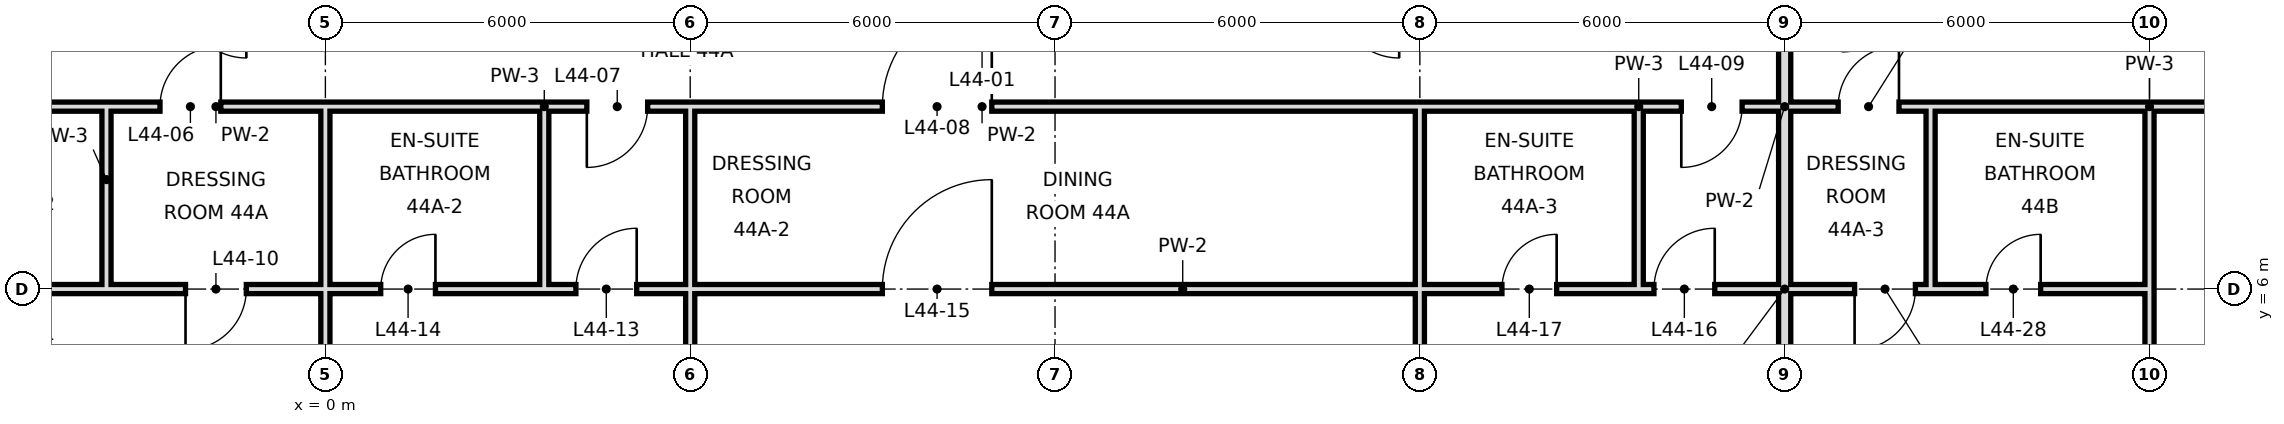
"""IFC4 building model, lengths in metres.
Left out: names, types, materials, properties, quantities, classifications, styles, units other than length and angle.
Written with IfcOpenShell. Run it as: python <this file> out.ifc"""

import sys

from ifc_helpers import new_model, si_unit, direction, frame, frame_2d, origin, place, context, subcontext, project, spatial, rectangle, extrude, element, fill, save


model = new_model("IFC4")
c1 = context("Model", 3, precision=1e-05, world=origin(), true_north=direction((0.0, 1.0)))
c2 = subcontext(c1, "Body", "Model", "MODEL_VIEW")
j1 = project(units=[si_unit("LENGTHUNIT", "METRE"), si_unit("PLANEANGLEUNIT", "RADIAN")], contexts=[c1])
p1 = place(None, origin())
s1 = spatial("IfcSite", under=j1, at=p1, CompositionType="ELEMENT")
p2 = place(p1, origin())
s2 = spatial("IfcBuilding", under=s1, at=p2, CompositionType="ELEMENT")
p3 = place(p2, frame((0.0, 0.0, 192.0)))
s3 = spatial("IfcBuildingStorey", under=s2, at=p3, CompositionType="ELEMENT", Elevation=192.0)
p4 = place(p3, frame((-3.6, 6.0, 0.0), z_axis=(0.0, 0.0, 1.0), x_axis=(0.0, 1.0, 0.0)))
e1 = element("IfcWall", 1, at=p4, inside=s3, PredefinedType="PARTITIONING", context=c2, shape_type="SweptSolid", body=[
    extrude(rectangle(XDim=3.0, YDim=0.15, at=frame_2d((1.5, 0.0))), origin(), (0.0, 0.0, 1.0), 3.42),
])
p5 = place(p3, frame((0.0, 0.0, 0.0), z_axis=(0.0, 0.0, 1.0), x_axis=(0.0, 1.0, 0.0)))
e2 = element("IfcWall", 2, at=p5, inside=s3, PredefinedType="PARTITIONING", context=c2, shape_type="SweptSolid", body=[
    extrude(rectangle(XDim=6.0, YDim=0.15, at=frame_2d((3.0, 0.0))), origin(), (0.0, 0.0, 1.0), 2.72),
])
p6 = place(p3, frame((0.0, 6.0, 0.0), z_axis=(0.0, 0.0, 1.0), x_axis=(0.0, 1.0, 0.0)))
e3 = element("IfcWall", 3, at=p6, inside=s3, PredefinedType="PARTITIONING", context=c2, shape_type="SweptSolid", body=[
    extrude(rectangle(XDim=3.0, YDim=0.15, at=frame_2d((1.5, 0.0))), origin(), (0.0, 0.0, 1.0), 2.72),
])
p7 = place(p3, frame((18.0, -0.6, 0.0), z_axis=(0.0, 0.0, 1.0), x_axis=(0.0, 1.0, 0.0)))
e4 = element("IfcWall", 4, at=p7, inside=s3, PredefinedType="PARTITIONING", context=c2, shape_type="SweptSolid", body=[
    extrude(rectangle(XDim=6.6, YDim=0.15, at=frame_2d((3.3, 0.0))), origin(), (0.0, 0.0, 1.0), 2.72),
])
p8 = place(p3, frame((18.0, 6.0, 0.0), z_axis=(0.0, 0.0, 1.0), x_axis=(0.0, 1.0, 0.0)))
e5 = element("IfcWall", 5, at=p8, inside=s3, PredefinedType="PARTITIONING", context=c2, shape_type="SweptSolid", body=[
    extrude(rectangle(XDim=3.0, YDim=0.15, at=frame_2d((1.5, 0.0))), origin(), (0.0, 0.0, 1.0), 2.72),
])
p9 = place(p3, frame((21.6, 6.0, 0.0), z_axis=(0.0, 0.0, 1.0), x_axis=(0.0, 1.0, 0.0)))
e6 = element("IfcWall", 6, at=p9, inside=s3, PredefinedType="PARTITIONING", context=c2, shape_type="SweptSolid", body=[
    extrude(rectangle(XDim=3.0, YDim=0.15, at=frame_2d((1.5, 0.0))), origin(), (0.0, 0.0, 1.0), 3.42),
])
p10 = place(p3, frame((24.0, 0.0, 0.0), z_axis=(0.0, 0.0, 1.0), x_axis=(0.0, 1.0, 0.0)))
e7 = element("IfcWall", 7, at=p10, inside=s3, PredefinedType="SOLIDWALL", context=c2, shape_type="SweptSolid", body=[
    extrude(rectangle(XDim=15.3, YDim=0.2, at=frame_2d((7.65, 0.0))), origin(), (0.0, 0.0, 1.0), 2.72),
])
for number, where, z_axis, x_axis in (
    (8, (26.4, 6.0, 0.0), (0.0, 0.0, 1.0), (0.0, 1.0, 0.0)),
    (9, (3.6, 6.0, 0.0), (0.0, 0.0, 1.0), (0.0, 1.0, 0.0)),
):
    element("IfcWall", number, at=place(p3, frame(where, z_axis=z_axis, x_axis=x_axis)), inside=s3, PredefinedType="PARTITIONING", context=c2, shape_type="SweptSolid", body=[
        extrude(rectangle(XDim=3.0, YDim=0.15, at=frame_2d((1.5, 0.0))), origin(), (0.0, 0.0, 1.0), 3.42),
    ])
p11 = place(p3, frame((30.0, -0.6, 0.0), z_axis=(0.0, 0.0, 1.0), x_axis=(0.0, 1.0, 0.0)))
e10 = element("IfcWall", 10, at=p11, inside=s3, PredefinedType="PARTITIONING", context=c2, shape_type="SweptSolid", body=[
    extrude(rectangle(XDim=6.6, YDim=0.15, at=frame_2d((3.3, 0.0))), origin(), (0.0, 0.0, 1.0), 2.72),
])
p12 = place(p3, frame((30.0, 6.0, 0.0), z_axis=(0.0, 0.0, 1.0), x_axis=(0.0, 1.0, 0.0)))
e11 = element("IfcWall", 11, at=p12, inside=s3, PredefinedType="PARTITIONING", context=c2, shape_type="SweptSolid", body=[
    extrude(rectangle(XDim=3.0, YDim=0.15, at=frame_2d((1.5, 0.0))), origin(), (0.0, 0.0, 1.0), 2.72),
])
p13 = place(p3, frame((6.0, -0.6, 0.0), z_axis=(0.0, 0.0, 1.0), x_axis=(0.0, 1.0, 0.0)))
e12 = element("IfcWall", 12, at=p13, inside=s3, PredefinedType="PARTITIONING", context=c2, shape_type="SweptSolid", body=[
    extrude(rectangle(XDim=9.6, YDim=0.15, at=frame_2d((4.8, 0.0))), origin(), (0.0, 0.0, 1.0), 2.72),
])
p14 = place(p3, frame((-3.6, 6.0, 0.0), z_axis=(0.0, 0.0, 1.0), x_axis=(1.0, 0.0, 0.0)))
e13 = element("IfcWall", 13, at=p14, inside=s3, PredefinedType="PARTITIONING", context=c2, shape_type="SweptSolid", body=[
    extrude(rectangle(XDim=3.6, YDim=0.15, at=frame_2d((1.8, 0.0))), origin(), (0.0, 0.0, 1.0), 2.72),
])
p15 = place(p14, frame((1.3, 0.0, 0.0)))
e14 = element("IfcOpeningElement", 14, at=p15, cuts=e13, PredefinedType="OPENING", context=c2, shape_type="SweptSolid", body=[
    extrude(rectangle(XDim=1.0, YDim=2.4, at=frame_2d((0.5, 1.2))), frame((0.0, 0.085, 0.0), z_axis=(0.0, -1.0, 0.0), x_axis=(1.0, 0.0, 0.0)), (0.0, 0.0, 1.0), 0.17),
])
p16 = place(p3, frame((3.6, 6.0, 0.0), z_axis=(0.0, 0.0, 1.0), x_axis=(1.0, 0.0, 0.0)))
e15 = element("IfcWall", 15, at=p16, inside=s3, PredefinedType="PARTITIONING", context=c2, shape_type="SweptSolid", body=[
    extrude(rectangle(XDim=14.4, YDim=0.15, at=frame_2d((7.2, 0.0))), origin(), (0.0, 0.0, 1.0), 2.97),
])
p17 = place(p16, frame((0.52, 0.0, 0.0)))
e16 = element("IfcOpeningElement", 16, at=p17, cuts=e15, PredefinedType="OPENING", context=c2, shape_type="SweptSolid", body=[
    extrude(rectangle(XDim=1.0, YDim=2.4, at=frame_2d((0.5, 1.2))), frame((0.0, 0.085, 0.0), z_axis=(0.0, -1.0, 0.0), x_axis=(1.0, 0.0, 0.0)), (0.0, 0.0, 1.0), 0.17),
])
p18 = place(p16, frame((5.56, 0.0, 0.0)))
e17 = element("IfcOpeningElement", 17, at=p18, cuts=e15, PredefinedType="OPENING", context=c2, shape_type="SweptSolid", body=[
    extrude(rectangle(XDim=1.8, YDim=2.4, at=frame_2d((0.9, 1.2))), frame((0.0, 0.085, 0.0), z_axis=(0.0, -1.0, 0.0), x_axis=(1.0, 0.0, 0.0)), (0.0, 0.0, 1.0), 0.17),
])
p19 = place(p3, frame((21.6, 6.0, 0.0), z_axis=(0.0, 0.0, 1.0), x_axis=(1.0, 0.0, 0.0)))
e18 = element("IfcWall", 18, at=p19, inside=s3, PredefinedType="PARTITIONING", context=c2, shape_type="SweptSolid", body=[
    extrude(rectangle(XDim=4.8, YDim=0.15, at=frame_2d((2.4, 0.0))), origin(), (0.0, 0.0, 1.0), 2.97),
])
p20 = place(p19, frame((0.25, 0.0, 0.0)))
e19 = element("IfcOpeningElement", 19, at=p20, cuts=e18, PredefinedType="OPENING", context=c2, shape_type="SweptSolid", body=[
    extrude(rectangle(XDim=1.0, YDim=2.4, at=frame_2d((0.5, 1.2))), frame((0.0, 0.085, 0.0), z_axis=(0.0, -1.0, 0.0), x_axis=(1.0, 0.0, 0.0)), (0.0, 0.0, 1.0), 0.17),
])
p21 = place(p19, frame((3.55, 0.0, 0.0)))
e20 = element("IfcOpeningElement", 20, at=p21, cuts=e18, PredefinedType="OPENING", context=c2, shape_type="SweptSolid", body=[
    extrude(rectangle(XDim=1.0, YDim=2.4, at=frame_2d((0.5, 1.2))), frame((0.0, 0.085, 0.0), z_axis=(0.0, -1.0, 0.0), x_axis=(1.0, 0.0, 0.0)), (0.0, 0.0, 1.0), 0.17),
])
p22 = place(p3, frame((-12.0, 6.0, 0.0), z_axis=(0.0, 0.0, 1.0), x_axis=(1.0, 0.0, 0.0)))
e21 = element("IfcWall", 21, at=p22, inside=s3, PredefinedType="PARTITIONING", context=c2, shape_type="SweptSolid", body=[
    extrude(rectangle(XDim=8.4, YDim=0.15, at=frame_2d((4.2, 0.0))), origin(), (0.0, 0.0, 1.0), 2.72),
])
p23 = place(p22, frame((6.55, 0.0, 0.0)))
e22 = element("IfcOpeningElement", 22, at=p23, cuts=e21, PredefinedType="OPENING", context=c2, shape_type="SweptSolid", body=[
    extrude(rectangle(XDim=0.9, YDim=2.4, at=frame_2d((0.45, 1.2))), frame((0.0, 0.085, 0.0), z_axis=(0.0, -1.0, 0.0), x_axis=(1.0, 0.0, 0.0)), (0.0, 0.0, 1.0), 0.17),
])
p24 = place(p3, frame((0.0, 6.0, 0.0), z_axis=(0.0, 0.0, 1.0), x_axis=(1.0, 0.0, 0.0)))
e23 = element("IfcWall", 23, at=p24, inside=s3, PredefinedType="PARTITIONING", context=c2, shape_type="SweptSolid", body=[
    extrude(rectangle(XDim=3.6, YDim=0.15, at=frame_2d((1.8, 0.0))), origin(), (0.0, 0.0, 1.0), 2.97),
])
p25 = place(p24, frame((0.91, 0.0, 0.0)))
e24 = element("IfcOpeningElement", 24, at=p25, cuts=e23, PredefinedType="OPENING", context=c2, shape_type="SweptSolid", body=[
    extrude(rectangle(XDim=0.9, YDim=2.4, at=frame_2d((0.45, 1.2))), frame((0.0, 0.085, 0.0), z_axis=(0.0, -1.0, 0.0), x_axis=(1.0, 0.0, 0.0)), (0.0, 0.0, 1.0), 0.17),
])
p26 = place(p3, frame((18.0, 6.0, 0.0), z_axis=(0.0, 0.0, 1.0), x_axis=(1.0, 0.0, 0.0)))
e25 = element("IfcWall", 25, at=p26, inside=s3, PredefinedType="PARTITIONING", context=c2, shape_type="SweptSolid", body=[
    extrude(rectangle(XDim=3.6, YDim=0.15, at=frame_2d((1.8, 0.0))), origin(), (0.0, 0.0, 1.0), 2.97),
])
p27 = place(p26, frame((1.35, 0.0, 0.0)))
e26 = element("IfcOpeningElement", 26, at=p27, cuts=e25, PredefinedType="OPENING", context=c2, shape_type="SweptSolid", body=[
    extrude(rectangle(XDim=0.9, YDim=2.4, at=frame_2d((0.45, 1.2))), frame((0.0, 0.085, 0.0), z_axis=(0.0, -1.0, 0.0), x_axis=(1.0, 0.0, 0.0)), (0.0, 0.0, 1.0), 0.17),
])
p28 = place(p3, frame((26.4, 6.0, 0.0), z_axis=(0.0, 0.0, 1.0), x_axis=(1.0, 0.0, 0.0)))
e27 = element("IfcWall", 27, at=p28, inside=s3, PredefinedType="PARTITIONING", context=c2, shape_type="SweptSolid", body=[
    extrude(rectangle(XDim=3.6, YDim=0.15, at=frame_2d((1.8, 0.0))), origin(), (0.0, 0.0, 1.0), 2.97),
])
p29 = place(p28, frame((0.91, 0.0, 0.0)))
e28 = element("IfcOpeningElement", 28, at=p29, cuts=e27, PredefinedType="OPENING", context=c2, shape_type="SweptSolid", body=[
    extrude(rectangle(XDim=0.9, YDim=2.4, at=frame_2d((0.45, 1.2))), frame((0.0, 0.085, 0.0), z_axis=(0.0, -1.0, 0.0), x_axis=(1.0, 0.0, 0.0)), (0.0, 0.0, 1.0), 0.17),
])
p30 = place(p3, frame((-3.6, 9.0, 0.0), z_axis=(0.0, 0.0, 1.0), x_axis=(1.0, 0.0, 0.0)))
e29 = element("IfcWall", 29, at=p30, inside=s3, PredefinedType="PARTITIONING", context=c2, shape_type="SweptSolid", body=[
    extrude(rectangle(XDim=3.6, YDim=0.15, at=frame_2d((1.8, 0.0))), origin(), (0.0, 0.0, 1.0), 3.42),
])
p31 = place(p30, frame((0.88, 0.0, 0.0)))
e30 = element("IfcOpeningElement", 30, at=p31, cuts=e29, PredefinedType="OPENING", context=c2, shape_type="SweptSolid", body=[
    extrude(rectangle(XDim=1.0, YDim=2.4, at=frame_2d((0.5, 1.2))), frame((0.0, 0.085, 0.0), z_axis=(0.0, -1.0, 0.0), x_axis=(1.0, 0.0, 0.0)), (0.0, 0.0, 1.0), 0.17),
])
p32 = place(p3, frame((3.6, 9.0, 0.0), z_axis=(0.0, 0.0, 1.0), x_axis=(1.0, 0.0, 0.0)))
e31 = element("IfcWall", 31, at=p32, inside=s3, PredefinedType="PARTITIONING", context=c2, shape_type="SweptSolid", body=[
    extrude(rectangle(XDim=14.4, YDim=0.15, at=frame_2d((7.2, 0.0))), origin(), (0.0, 0.0, 1.0), 3.42),
])
p33 = place(p32, frame((0.7, 0.0, 0.0)))
e32 = element("IfcOpeningElement", 32, at=p33, cuts=e31, PredefinedType="OPENING", context=c2, shape_type="SweptSolid", body=[
    extrude(rectangle(XDim=1.0, YDim=2.4, at=frame_2d((0.5, 1.2))), frame((0.0, 0.085, 0.0), z_axis=(0.0, -1.0, 0.0), x_axis=(1.0, 0.0, 0.0)), (0.0, 0.0, 1.0), 0.17),
])
p34 = place(p32, frame((5.56, 0.0, 0.0)))
e33 = element("IfcOpeningElement", 33, at=p34, cuts=e31, PredefinedType="OPENING", context=c2, shape_type="SweptSolid", body=[
    extrude(rectangle(XDim=1.8, YDim=2.4, at=frame_2d((0.9, 1.2))), frame((0.0, 0.085, 0.0), z_axis=(0.0, -1.0, 0.0), x_axis=(1.0, 0.0, 0.0)), (0.0, 0.0, 1.0), 0.17),
])
p35 = place(p3, frame((21.6, 9.0, 0.0), z_axis=(0.0, 0.0, 1.0), x_axis=(1.0, 0.0, 0.0)))
e34 = element("IfcWall", 34, at=p35, inside=s3, PredefinedType="PARTITIONING", context=c2, shape_type="SweptSolid", body=[
    extrude(rectangle(XDim=4.8, YDim=0.15, at=frame_2d((2.4, 0.0))), origin(), (0.0, 0.0, 1.0), 3.42),
])
p36 = place(p35, frame((0.7, 0.0, 0.0)))
e35 = element("IfcOpeningElement", 35, at=p36, cuts=e34, PredefinedType="OPENING", context=c2, shape_type="SweptSolid", body=[
    extrude(rectangle(XDim=1.0, YDim=2.4, at=frame_2d((0.5, 1.2))), frame((0.0, 0.085, 0.0), z_axis=(0.0, -1.0, 0.0), x_axis=(1.0, 0.0, 0.0)), (0.0, 0.0, 1.0), 0.17),
])
p37 = place(p35, frame((3.28, 0.0, 0.0)))
e36 = element("IfcOpeningElement", 36, at=p37, cuts=e34, PredefinedType="OPENING", context=c2, shape_type="SweptSolid", body=[
    extrude(rectangle(XDim=1.0, YDim=2.4, at=frame_2d((0.5, 1.2))), frame((0.0, 0.085, 0.0), z_axis=(0.0, -1.0, 0.0), x_axis=(1.0, 0.0, 0.0)), (0.0, 0.0, 1.0), 0.17),
])
p38 = place(p3, frame((30.0, 9.0, 0.0), z_axis=(0.0, 0.0, 1.0), x_axis=(1.0, 0.0, 0.0)))
e37 = element("IfcWall", 37, at=p38, inside=s3, PredefinedType="PARTITIONING", context=c2, shape_type="SweptSolid", body=[
    extrude(rectangle(XDim=6.0, YDim=0.15, at=frame_2d((3.0, 0.0))), origin(), (0.0, 0.0, 1.0), 3.42),
])
p39 = place(p38, frame((1.36, 0.0, 0.0)))
e38 = element("IfcOpeningElement", 38, at=p39, cuts=e37, PredefinedType="OPENING", context=c2, shape_type="SweptSolid", body=[
    extrude(rectangle(XDim=1.8, YDim=2.4, at=frame_2d((0.9, 1.2))), frame((0.0, 0.085, 0.0), z_axis=(0.0, -1.0, 0.0), x_axis=(1.0, 0.0, 0.0)), (0.0, 0.0, 1.0), 0.17),
])
p40 = place(p3, frame((-12.6, 9.0, 0.0), z_axis=(0.0, 0.0, 1.0), x_axis=(1.0, 0.0, 0.0)))
e39 = element("IfcWall", 39, at=p40, inside=s3, PredefinedType="PARTITIONING", context=c2, shape_type="SweptSolid", body=[
    extrude(rectangle(XDim=9.0, YDim=0.15, at=frame_2d((4.5, 0.0))), origin(), (0.0, 0.0, 1.0), 3.42),
])
for number, where, z_axis, x_axis in (
    (40, (0.0, 9.0, 0.0), (0.0, 0.0, 1.0), (1.0, 0.0, 0.0)),
    (41, (18.0, 9.0, 0.0), (0.0, 0.0, 1.0), (1.0, 0.0, 0.0)),
    (42, (26.4, 9.0, 0.0), (0.0, 0.0, 1.0), (1.0, 0.0, 0.0)),
):
    element("IfcWall", number, at=place(p3, frame(where, z_axis=z_axis, x_axis=x_axis)), inside=s3, PredefinedType="PARTITIONING", context=c2, shape_type="SweptSolid", body=[
        extrude(rectangle(XDim=3.6, YDim=0.15, at=frame_2d((1.8, 0.0))), origin(), (0.0, 0.0, 1.0), 3.42),
    ])
p41 = place(p31, frame((1.0, 0.0, 0.0), z_axis=(0.0, 0.0, 1.0), x_axis=(-1.0, 0.0, 0.0)))
e43 = element("IfcDoor", 43, at=p41, inside=s3, OperationType="SINGLE_SWING_LEFT", PredefinedType="DOOR", context=c2, shape_type="SweptSolid", body=[
    extrude(rectangle(XDim=1.0, YDim=2.4, at=frame_2d((0.5, 1.2))), frame((0.0, 0.025, 0.0), z_axis=(0.0, -1.0, 0.0), x_axis=(1.0, 0.0, 0.0)), (0.0, 0.0, 1.0), 0.05),
])
fill(e30, e43)
p42 = place(p33, frame((1.0, 0.0, 0.0), z_axis=(0.0, 0.0, 1.0), x_axis=(-1.0, 0.0, 0.0)))
e44 = element("IfcDoor", 44, at=p42, inside=s3, OperationType="SINGLE_SWING_RIGHT", PredefinedType="DOOR", context=c2, shape_type="SweptSolid", body=[
    extrude(rectangle(XDim=1.0, YDim=2.4, at=frame_2d((0.5, 1.2))), frame((0.0, 0.025, 0.0), z_axis=(0.0, -1.0, 0.0), x_axis=(1.0, 0.0, 0.0)), (0.0, 0.0, 1.0), 0.05),
])
fill(e32, e44)
p43 = place(p34, frame((1.8, 0.0, 0.0), z_axis=(0.0, 0.0, 1.0), x_axis=(-1.0, 0.0, 0.0)))
e45 = element("IfcDoor", 45, at=p43, inside=s3, OperationType="SINGLE_SWING_LEFT", PredefinedType="DOOR", context=c2, shape_type="SweptSolid", body=[
    extrude(rectangle(XDim=1.8, YDim=2.4, at=frame_2d((0.9, 1.2))), frame((0.0, 0.025, 0.0), z_axis=(0.0, -1.0, 0.0), x_axis=(1.0, 0.0, 0.0)), (0.0, 0.0, 1.0), 0.05),
])
fill(e33, e45)
p44 = place(p36, frame((1.0, 0.0, 0.0), z_axis=(0.0, 0.0, 1.0), x_axis=(-1.0, 0.0, 0.0)))
e46 = element("IfcDoor", 46, at=p44, inside=s3, OperationType="SINGLE_SWING_RIGHT", PredefinedType="DOOR", context=c2, shape_type="SweptSolid", body=[
    extrude(rectangle(XDim=1.0, YDim=2.4, at=frame_2d((0.5, 1.2))), frame((0.0, 0.025, 0.0), z_axis=(0.0, -1.0, 0.0), x_axis=(1.0, 0.0, 0.0)), (0.0, 0.0, 1.0), 0.05),
])
fill(e35, e46)
p45 = place(p15, frame((1.0, 0.0, 0.0), z_axis=(0.0, 0.0, 1.0), x_axis=(-1.0, 0.0, 0.0)))
e47 = element("IfcDoor", 47, at=p45, inside=s3, OperationType="SINGLE_SWING_RIGHT", PredefinedType="DOOR", context=c2, shape_type="SweptSolid", body=[
    extrude(rectangle(XDim=1.0, YDim=2.4, at=frame_2d((0.5, 1.2))), frame((0.0, 0.025, 0.0), z_axis=(0.0, -1.0, 0.0), x_axis=(1.0, 0.0, 0.0)), (0.0, 0.0, 1.0), 0.05),
])
fill(e14, e47)
p46 = place(p17, frame((1.0, 0.0, 0.0), z_axis=(0.0, 0.0, 1.0), x_axis=(-1.0, 0.0, 0.0)))
e48 = element("IfcDoor", 48, at=p46, inside=s3, OperationType="SINGLE_SWING_LEFT", PredefinedType="DOOR", context=c2, shape_type="SweptSolid", body=[
    extrude(rectangle(XDim=1.0, YDim=2.4, at=frame_2d((0.5, 1.2))), frame((0.0, 0.025, 0.0), z_axis=(0.0, -1.0, 0.0), x_axis=(1.0, 0.0, 0.0)), (0.0, 0.0, 1.0), 0.05),
])
fill(e16, e48)
p47 = place(p25, frame((0.9, 0.0, 0.0), z_axis=(0.0, 0.0, 1.0), x_axis=(-1.0, 0.0, 0.0)))
e49 = element("IfcDoor", 49, at=p47, inside=s3, OperationType="SINGLE_SWING_LEFT", PredefinedType="DOOR", context=c2, shape_type="SweptSolid", body=[
    extrude(rectangle(XDim=0.9, YDim=2.4, at=frame_2d((0.45, 1.2))), frame((0.0, 0.025, 0.0), z_axis=(0.0, -1.0, 0.0), x_axis=(1.0, 0.0, 0.0)), (0.0, 0.0, 1.0), 0.05),
])
fill(e24, e49)
p48 = place(p18, frame((1.8, 0.0, 0.0), z_axis=(0.0, 0.0, 1.0), x_axis=(-1.0, 0.0, 0.0)))
e50 = element("IfcDoor", 50, at=p48, inside=s3, OperationType="SINGLE_SWING_LEFT", PredefinedType="DOOR", context=c2, shape_type="SweptSolid", body=[
    extrude(rectangle(XDim=1.8, YDim=2.4, at=frame_2d((0.9, 1.2))), frame((0.0, 0.025, 0.0), z_axis=(0.0, -1.0, 0.0), x_axis=(1.0, 0.0, 0.0)), (0.0, 0.0, 1.0), 0.05),
])
fill(e17, e50)
p49 = place(p20, frame((1.0, 0.0, 0.0), z_axis=(0.0, 0.0, 1.0), x_axis=(-1.0, 0.0, 0.0)))
e51 = element("IfcDoor", 51, at=p49, inside=s3, OperationType="SINGLE_SWING_LEFT", PredefinedType="DOOR", context=c2, shape_type="SweptSolid", body=[
    extrude(rectangle(XDim=1.0, YDim=2.4, at=frame_2d((0.5, 1.2))), frame((0.0, 0.025, 0.0), z_axis=(0.0, -1.0, 0.0), x_axis=(1.0, 0.0, 0.0)), (0.0, 0.0, 1.0), 0.05),
])
fill(e19, e51)
p50 = place(p27, frame((0.9, 0.0, 0.0), z_axis=(0.0, 0.0, 1.0), x_axis=(-1.0, 0.0, 0.0)))
e52 = element("IfcDoor", 52, at=p50, inside=s3, OperationType="SINGLE_SWING_LEFT", PredefinedType="DOOR", context=c2, shape_type="SweptSolid", body=[
    extrude(rectangle(XDim=0.9, YDim=2.4, at=frame_2d((0.45, 1.2))), frame((0.0, 0.025, 0.0), z_axis=(0.0, -1.0, 0.0), x_axis=(1.0, 0.0, 0.0)), (0.0, 0.0, 1.0), 0.05),
])
fill(e26, e52)
p51 = place(p37, frame((1.0, 0.0, 0.0), z_axis=(0.0, 0.0, 1.0), x_axis=(-1.0, 0.0, 0.0)))
e53 = element("IfcDoor", 53, at=p51, inside=s3, OperationType="SINGLE_SWING_LEFT", PredefinedType="DOOR", context=c2, shape_type="SweptSolid", body=[
    extrude(rectangle(XDim=1.0, YDim=2.4, at=frame_2d((0.5, 1.2))), frame((0.0, 0.025, 0.0), z_axis=(0.0, -1.0, 0.0), x_axis=(1.0, 0.0, 0.0)), (0.0, 0.0, 1.0), 0.05),
])
fill(e36, e53)
p52 = place(p21, frame((1.0, 0.0, 0.0), z_axis=(0.0, 0.0, 1.0), x_axis=(-1.0, 0.0, 0.0)))
e54 = element("IfcDoor", 54, at=p52, inside=s3, OperationType="SINGLE_SWING_RIGHT", PredefinedType="DOOR", context=c2, shape_type="SweptSolid", body=[
    extrude(rectangle(XDim=1.0, YDim=2.4, at=frame_2d((0.5, 1.2))), frame((0.0, 0.025, 0.0), z_axis=(0.0, -1.0, 0.0), x_axis=(1.0, 0.0, 0.0)), (0.0, 0.0, 1.0), 0.05),
])
fill(e20, e54)
p53 = place(p29, frame((0.9, 0.0, 0.0), z_axis=(0.0, 0.0, 1.0), x_axis=(-1.0, 0.0, 0.0)))
e55 = element("IfcDoor", 55, at=p53, inside=s3, OperationType="SINGLE_SWING_LEFT", PredefinedType="DOOR", context=c2, shape_type="SweptSolid", body=[
    extrude(rectangle(XDim=0.9, YDim=2.4, at=frame_2d((0.45, 1.2))), frame((0.0, 0.025, 0.0), z_axis=(0.0, -1.0, 0.0), x_axis=(1.0, 0.0, 0.0)), (0.0, 0.0, 1.0), 0.05),
])
fill(e28, e55)
save(model, sys.argv[1])
